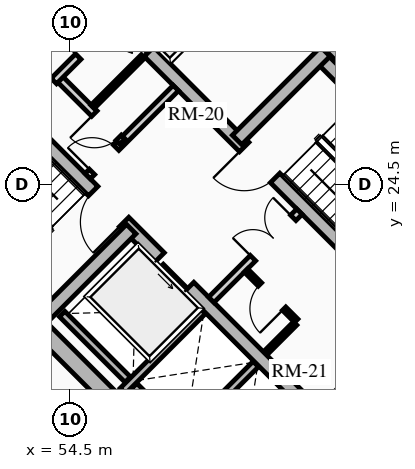
"""IFC4 building model, lengths in metres.
Left out: names, types, materials, properties, quantities, classifications, styles, units other than length and angle.
Written with IfcOpenShell. Run it as: python <this file> out.ifc"""

import sys

from ifc_helpers import new_model, si_unit, direction, frame, frame_2d, origin, place, context, subcontext, project, spatial, rectangle, extrude, source, transform, mapped, element, fill, save


model = new_model("IFC4")
c1 = context("Model", 3, precision=1e-05, world=origin(), true_north=direction((0.0, 1.0)))
c2 = subcontext(c1, "Body", "Model", "MODEL_VIEW")
j1 = project(units=[si_unit("LENGTHUNIT", "METRE"), si_unit("PLANEANGLEUNIT", "RADIAN")], contexts=[c1])
p1 = place(None, origin())
s1 = spatial("IfcSite", under=j1, at=p1, CompositionType="ELEMENT")
p2 = place(p1, origin())
s2 = spatial("IfcBuilding", under=s1, at=p2, CompositionType="ELEMENT")
p3 = place(p2, frame((0.0, 0.0, 110.89)))
s3 = spatial("IfcBuildingStorey", under=s2, at=p3, CompositionType="ELEMENT", Elevation=110.89)
for number, where, z_axis, x_axis in (
    (1, (58.737, 15.697, 0.0), (0.0, 0.0, 1.0), (-0.707, 0.707, 0.0)),
    (2, (66.303, 23.263, 0.0), (0.0, 0.0, 1.0), (-0.707, 0.707, 0.0)),
):
    element("IfcWall", number, at=place(p3, frame(where, z_axis=z_axis, x_axis=x_axis)), inside=s3, PredefinedType="SHEAR", context=c2, shape_type="SweptSolid", body=[
        extrude(rectangle(XDim=14.2, YDim=0.45, at=frame_2d((7.1, 0.0))), origin(), (0.0, 0.0, 1.0), 2.91),
    ])
p4 = place(p3, frame((58.578, 15.856, 0.0), z_axis=(0.0, 0.0, 1.0), x_axis=(0.707106781187, 0.707106781187, 0.0)))
e3 = element("IfcWall", 3, at=p4, inside=s3, PredefinedType="SHEAR", context=c2, shape_type="SweptSolid", body=[
    extrude(rectangle(XDim=10.7, YDim=0.45, at=frame_2d((5.35, 0.0))), origin(), (0.0, 0.0, 1.0), 2.91),
])
m1 = source(origin(), c2, "Body", "SweptSolid", [
    extrude(rectangle(XDim=1.5, YDim=2.02, at=frame_2d((0.75, 1.01))), frame((0.0, 0.235, 0.0), z_axis=(0.0, -1.0, 0.0), x_axis=(1.0, 0.0, 0.0)), (0.0, 0.0, 1.0), 0.47),
])
p5 = place(p4, frame((5.45, 0.0, 0.0)))
e4 = element("IfcOpeningElement", 4, at=p5, cuts=e3, PredefinedType="OPENING", context=c2, shape_type="MappedRepresentation", body=[
    mapped(m1, transform((0.0, 0.0, 0.0), x_axis=(1.0, 0.0, 0.0), y_axis=(0.0, 1.0, 0.0), z_axis=(0.0, 0.0, 1.0), scale=1.0)),
])
p6 = place(p3, frame((48.856, 25.578, 0.0), z_axis=(0.0, 0.0, 1.0), x_axis=(0.707106781187, 0.707106781187, 0.0)))
e5 = element("IfcWall", 5, at=p6, inside=s3, PredefinedType="SHEAR", context=c2, shape_type="SweptSolid", body=[
    extrude(rectangle(XDim=10.7, YDim=0.45, at=frame_2d((5.35, 0.0))), origin(), (0.0, 0.0, 1.0), 2.91),
])
p7 = place(p6, frame((4.6, 0.0, 0.0)))
e6 = element("IfcOpeningElement", 6, at=p7, cuts=e5, PredefinedType="OPENING", context=c2, shape_type="MappedRepresentation", body=[
    mapped(m1, transform((0.0, 0.0, 0.0), x_axis=(1.0, 0.0, 0.0), y_axis=(0.0, 1.0, 0.0), z_axis=(0.0, 0.0, 1.0), scale=1.0)),
])
p8 = place(p3, frame((61.078, 18.355, 0.0), z_axis=(0.0, 0.0, 1.0), x_axis=(-0.707106781187, 0.707106781187, 0.0)))
e7 = element("IfcWall", 7, at=p8, inside=s3, PredefinedType="SHEAR", context=c2, shape_type="SweptSolid", body=[
    extrude(rectangle(XDim=13.75, YDim=0.35, at=frame_2d((6.875, 0.0))), origin(), (0.0, 0.0, 1.0), 2.91),
])
m2 = source(origin(), c2, "Body", "SweptSolid", [
    extrude(rectangle(XDim=1.1, YDim=2.015, at=frame_2d((0.55, 1.007))), frame((0.0, 0.185, 0.0), z_axis=(0.0, -1.0, 0.0), x_axis=(1.0, 0.0, 0.0)), (0.0, 0.0, 1.0), 0.37),
])
p9 = place(p8, frame((4.875, 0.0, 0.0)))
e8 = element("IfcOpeningElement", 8, at=p9, cuts=e7, PredefinedType="OPENING", context=c2, shape_type="MappedRepresentation", body=[
    mapped(m2, transform((0.0, 0.0, 0.0), x_axis=(1.0, 0.0, 0.0), y_axis=(0.0, 1.0, 0.0), z_axis=(0.0, 0.0, 1.0), scale=1.0)),
])
m3 = source(origin(), c2, "Body", "SweptSolid", [
    extrude(rectangle(XDim=1.15, YDim=2.02, at=frame_2d((0.575, 1.01))), frame((0.0, 0.185, 0.0), z_axis=(0.0, -1.0, 0.0), x_axis=(1.0, 0.0, 0.0)), (0.0, 0.0, 1.0), 0.37),
])
p10 = place(p8, frame((7.295, 0.0, 0.0)))
e9 = element("IfcOpeningElement", 9, at=p10, cuts=e7, PredefinedType="OPENING", context=c2, shape_type="MappedRepresentation", body=[
    mapped(m3, transform((0.0, 0.0, 0.0), x_axis=(1.0, 0.0, 0.0), y_axis=(0.0, 1.0, 0.0), z_axis=(0.0, 0.0, 1.0), scale=1.0)),
])
p11 = place(p3, frame((63.645, 20.922, 0.0), z_axis=(0.0, 0.0, 1.0), x_axis=(-0.707106781187, 0.707106781187, 0.0)))
e10 = element("IfcWall", 10, at=p11, inside=s3, PredefinedType="SHEAR", context=c2, shape_type="SweptSolid", body=[
    extrude(rectangle(XDim=13.75, YDim=0.35, at=frame_2d((6.875, 0.0))), origin(), (0.0, 0.0, 1.0), 2.91),
])
p12 = place(p11, frame((10.0, 0.0, 0.0)))
e11 = element("IfcOpeningElement", 11, at=p12, cuts=e10, PredefinedType="OPENING", context=c2, shape_type="MappedRepresentation", body=[
    mapped(m2, transform((0.0, 0.0, 0.0), x_axis=(1.0, 0.0, 0.0), y_axis=(0.0, 1.0, 0.0), z_axis=(0.0, 0.0, 1.0), scale=1.0)),
])
p13 = place(p11, frame((12.0, 0.0, 0.0)))
e12 = element("IfcOpeningElement", 12, at=p13, cuts=e10, PredefinedType="OPENING", context=c2, shape_type="MappedRepresentation", body=[
    mapped(m2, transform((0.0, 0.0, 0.0), x_axis=(1.0, 0.0, 0.0), y_axis=(0.0, 1.0, 0.0), z_axis=(0.0, 0.0, 1.0), scale=1.0)),
])
p14 = place(p11, frame((5.305, 0.0, 0.0)))
e13 = element("IfcOpeningElement", 13, at=p14, cuts=e10, PredefinedType="OPENING", context=c2, shape_type="MappedRepresentation", body=[
    mapped(m3, transform((0.0, 0.0, 0.0), x_axis=(1.0, 0.0, 0.0), y_axis=(0.0, 1.0, 0.0), z_axis=(0.0, 0.0, 1.0), scale=1.0)),
])
p15 = place(p3, frame((53.922, 21.141, 0.0), z_axis=(0.0, 0.0, 1.0), x_axis=(-0.707088616009, 0.707124945897, 0.0)))
e14 = element("IfcWall", 14, at=p15, inside=s3, PredefinedType="SHEAR", context=c2, shape_type="SweptSolid", body=[
    extrude(rectangle(XDim=6.72, YDim=0.35, at=frame_2d((3.36, 0.0))), origin(), (0.0, 0.0, 1.0), 2.91),
])
p16 = place(p3, frame((53.784, 21.003, 0.0), z_axis=(0.0, 0.0, 1.0), x_axis=(0.707106781187, 0.707106781187, 0.0)))
e15 = element("IfcWall", 15, at=p16, inside=s3, PredefinedType="SHEAR", context=c2, shape_type="SweptSolid", body=[
    extrude(rectangle(XDim=3.285, YDim=0.35, at=frame_2d((1.643, 0.0))), origin(), (0.0, 0.0, 1.0), 2.91),
])
p17 = place(p3, frame((65.83, 23.107, 0.0), z_axis=(0.0, 0.0, 1.0), x_axis=(-0.707088616009, 0.707124945897, 0.0)))
e16 = element("IfcWall", 16, at=p17, inside=s3, PredefinedType="SHEAR", context=c2, shape_type="SweptSolid", body=[
    extrude(rectangle(XDim=6.72, YDim=0.35, at=frame_2d((3.36, 0.0))), origin(), (0.0, 0.0, 1.0), 2.91),
])
p18 = place(p3, frame((58.893, 25.674, 0.0), z_axis=(0.0, 0.0, 1.0), x_axis=(0.707106781187, 0.707106781187, 0.0)))
e17 = element("IfcWall", 17, at=p18, inside=s3, PredefinedType="SHEAR", context=c2, shape_type="SweptSolid", body=[
    extrude(rectangle(XDim=3.285, YDim=0.35, at=frame_2d((1.643, 0.0))), origin(), (0.0, 0.0, 1.0), 2.91),
])
p19 = place(p3, frame((55.888, 19.069, 0.0), z_axis=(0.0, 0.0, 1.0), x_axis=(0.707106781187, 0.707106781187, 0.0)))
e18 = element("IfcWall", 18, at=p19, inside=s3, PredefinedType="SHEAR", context=c2, shape_type="SweptSolid", body=[
    extrude(rectangle(XDim=2.97, YDim=0.2, at=frame_2d((1.485, 0.0))), origin(), (0.0, 0.0, 1.0), 2.91),
])
p20 = place(p3, frame((56.015, 19.366, 0.0), z_axis=(0.0, 0.0, 1.0), x_axis=(-0.707106781187, 0.707106781187, 0.0)))
e19 = element("IfcWall", 19, at=p20, inside=s3, PredefinedType="SHEAR", context=c2, shape_type="SweptSolid", body=[
    extrude(rectangle(XDim=2.44, YDim=0.2, at=frame_2d((1.22, 0.0))), origin(), (0.0, 0.0, 1.0), 2.91),
])
p21 = place(p3, frame((57.284, 17.673, 0.0), z_axis=(0.0, 0.0, 1.0), x_axis=(0.707147878904, 0.70706568108, 0.0)))
e20 = element("IfcWall", 20, at=p21, inside=s3, PredefinedType="SHEAR", context=c2, shape_type="SweptSolid", body=[
    extrude(rectangle(XDim=2.97, YDim=0.2, at=frame_2d((1.485, 0.0))), origin(), (0.0, 0.0, 1.0), 2.91),
])
p22 = place(p3, frame((57.412, 17.97, 0.0), z_axis=(0.0, 0.0, 1.0), x_axis=(-0.707106781187, 0.707106781187, 0.0)))
e21 = element("IfcWall", 21, at=p22, inside=s3, PredefinedType="SHEAR", context=c2, shape_type="SweptSolid", body=[
    extrude(rectangle(XDim=1.735, YDim=0.2, at=frame_2d((0.867, 0.0))), origin(), (0.0, 0.0, 1.0), 2.91),
])
p23 = place(p3, frame((57.062, 27.781, 0.0), z_axis=(0.0, 0.0, 1.0), x_axis=(0.707106781187, 0.707106781187, 0.0)))
e22 = element("IfcWall", 22, at=p23, inside=s3, PredefinedType="SHEAR", context=c2, shape_type="SweptSolid", body=[
    extrude(rectangle(XDim=2.97, YDim=0.2, at=frame_2d((1.485, 0.0))), origin(), (0.0, 0.0, 1.0), 2.91),
])
p24 = place(p3, frame((58.214, 21.467, 0.0), z_axis=(0.0, 0.0, 1.0), x_axis=(0.707106781187, 0.707106781187, 0.0)))
e23 = element("IfcWall", 23, at=p24, inside=s3, PredefinedType="PARTITIONING", context=c2, shape_type="SweptSolid", body=[
    extrude(rectangle(XDim=3.28, YDim=0.2, at=frame_2d((1.64, 0.0))), origin(), (0.0, 0.0, 1.0), 2.655),
])
m4 = source(origin(), c2, "Body", "SweptSolid", [
    extrude(rectangle(XDim=1.5, YDim=2.02, at=frame_2d((0.75, 1.01))), frame((0.0, 0.11, 0.0), z_axis=(0.0, -1.0, 0.0), x_axis=(1.0, 0.0, 0.0)), (0.0, 0.0, 1.0), 0.22),
])
p25 = place(p24, frame((1.55, 0.0, 0.0)))
e24 = element("IfcOpeningElement", 24, at=p25, cuts=e23, PredefinedType="OPENING", context=c2, shape_type="MappedRepresentation", body=[
    mapped(m4, transform((0.0, 0.0, 0.0), x_axis=(1.0, 0.0, 0.0), y_axis=(0.0, 1.0, 0.0), z_axis=(0.0, 0.0, 1.0), scale=1.0)),
])
p26 = place(p3, frame((54.961, 24.719, 0.0), z_axis=(0.0, 0.0, 1.0), x_axis=(0.707106781187, 0.707106781187, 0.0)))
e25 = element("IfcWall", 25, at=p26, inside=s3, PredefinedType="PARTITIONING", context=c2, shape_type="SweptSolid", body=[
    extrude(rectangle(XDim=3.28, YDim=0.2, at=frame_2d((1.64, 0.0))), origin(), (0.0, 0.0, 1.0), 2.655),
])
m5 = source(origin(), c2, "Body", "SweptSolid", [
    extrude(rectangle(XDim=0.9, YDim=2.005, at=frame_2d((0.45, 1.002))), frame((0.0, 0.11, 0.0), z_axis=(0.0, -1.0, 0.0), x_axis=(1.0, 0.0, 0.0)), (0.0, 0.0, 1.0), 0.22),
])
p27 = place(p26, frame((0.16, 0.0, 0.0)))
e26 = element("IfcOpeningElement", 26, at=p27, cuts=e25, PredefinedType="OPENING", context=c2, shape_type="MappedRepresentation", body=[
    mapped(m5, transform((0.0, 0.0, 0.0), x_axis=(1.0, 0.0, 0.0), y_axis=(0.0, 1.0, 0.0), z_axis=(0.0, 0.0, 1.0), scale=1.0)),
])
p28 = place(p3, frame((55.874, 25.631, 0.0), z_axis=(0.0, 0.0, 1.0), x_axis=(-0.707157639372, 0.707055919343, 0.0)))
e27 = element("IfcWall", 27, at=p28, inside=s3, PredefinedType="PARTITIONING", context=c2, shape_type="SweptSolid", body=[
    extrude(rectangle(XDim=2.4, YDim=0.2, at=frame_2d((1.2, 0.0))), origin(), (0.0, 0.0, 1.0), 2.655),
])
p29 = place(p28, frame((0.14, 0.0, 0.0)))
e28 = element("IfcOpeningElement", 28, at=p29, cuts=e27, PredefinedType="OPENING", context=c2, shape_type="MappedRepresentation", body=[
    mapped(m5, transform((0.0, 0.0, 0.0), x_axis=(1.0, 0.0, 0.0), y_axis=(0.0, 1.0, 0.0), z_axis=(0.0, 0.0, 1.0), scale=1.0)),
])
p30 = place(p3, frame((53.264, 26.416, 0.0), z_axis=(0.0, 0.0, 1.0), x_axis=(0.707106781187, 0.707106781187, 0.0)))
e29 = element("IfcWall", 29, at=p30, inside=s3, PredefinedType="PARTITIONING", context=c2, shape_type="SweptSolid", body=[
    extrude(rectangle(XDim=3.28, YDim=0.2, at=frame_2d((1.64, 0.0))), origin(), (0.0, 0.0, 1.0), 2.655),
])
m6 = source(origin(), c2, "Body", "SweptSolid", [
    extrude(rectangle(XDim=1.0, YDim=2.015, at=frame_2d((0.5, 1.007))), frame((0.0, 0.11, 0.0), z_axis=(0.0, -1.0, 0.0), x_axis=(1.0, 0.0, 0.0)), (0.0, 0.0, 1.0), 0.22),
])
p31 = place(p30, frame((0.14, 0.0, 0.0)))
e30 = element("IfcOpeningElement", 30, at=p31, cuts=e29, PredefinedType="OPENING", context=c2, shape_type="MappedRepresentation", body=[
    mapped(m6, transform((0.0, 0.0, 0.0), x_axis=(1.0, 0.0, 0.0), y_axis=(0.0, 1.0, 0.0), z_axis=(0.0, 0.0, 1.0), scale=1.0)),
])
p32 = place(p30, frame((2.05, 0.0, 0.0)))
e31 = element("IfcOpeningElement", 31, at=p32, cuts=e29, PredefinedType="OPENING", context=c2, shape_type="MappedRepresentation", body=[
    mapped(m5, transform((0.0, 0.0, 0.0), x_axis=(1.0, 0.0, 0.0), y_axis=(0.0, 1.0, 0.0), z_axis=(0.0, 0.0, 1.0), scale=1.0)),
])
p33 = place(p3, frame((60.448, 20.915, 0.0), z_axis=(0.0, 0.0, 1.0), x_axis=(-0.707106781187, 0.707106781187, 0.0)))
e32 = element("IfcWall", 32, at=p33, inside=s3, PredefinedType="PARTITIONING", context=c2, shape_type="SweptSolid", body=[
    extrude(rectangle(XDim=1.87, YDim=0.125, at=frame_2d((0.935, 0.0))), origin(), (0.0, 0.0, 1.0), 2.655),
])
m7 = source(origin(), c2, "Body", "SweptSolid", [
    extrude(rectangle(XDim=0.9, YDim=2.005, at=frame_2d((0.45, 1.002))), frame((0.0, 0.073, 0.0), z_axis=(0.0, -1.0, 0.0), x_axis=(1.0, 0.0, 0.0)), (0.0, 0.0, 1.0), 0.145),
])
p34 = place(p33, frame((0.45, 0.0, 0.0)))
e33 = element("IfcOpeningElement", 33, at=p34, cuts=e32, PredefinedType="OPENING", context=c2, shape_type="MappedRepresentation", body=[
    mapped(m7, transform((0.0, 0.0, 0.0), x_axis=(1.0, 0.0, 0.0), y_axis=(0.0, 1.0, 0.0), z_axis=(0.0, 0.0, 1.0), scale=1.0)),
])
p35 = place(p3, frame((59.643, 20.066, 0.0), z_axis=(0.0, 0.0, 1.0), x_axis=(0.707106781187, 0.707106781187, 0.0)))
e34 = element("IfcWall", 34, at=p35, inside=s3, PredefinedType="PARTITIONING", context=c2, shape_type="SweptSolid", body=[
    extrude(rectangle(XDim=1.1, YDim=0.125, at=frame_2d((0.55, 0.0))), origin(), (0.0, 0.0, 1.0), 2.655),
])
p36 = place(p3, frame((55.089, 26.543, 0.0), z_axis=(0.0, 0.0, 1.0), x_axis=(0.707106781187, 0.707106781187, 0.0)))
e35 = element("IfcWall", 35, at=p36, inside=s3, PredefinedType="PARTITIONING", context=c2, shape_type="SweptSolid", body=[
    extrude(rectangle(XDim=1.88, YDim=0.125, at=frame_2d((0.94, 0.0))), origin(), (0.0, 0.0, 1.0), 2.655),
])
m8 = source(origin(), c2, "Body", "SweptSolid", [
    extrude(rectangle(XDim=1.1, YDim=2.015, at=frame_2d((0.55, 1.007))), frame((0.0, 0.025, 0.0), z_axis=(0.0, -1.0, 0.0), x_axis=(1.0, 0.0, 0.0)), (0.0, 0.0, 1.0), 0.05),
])
p37 = place(p9, origin())
e36 = element("IfcDoor", 36, at=p37, inside=s3, OperationType="SLIDING_TO_LEFT", PredefinedType="DOOR", context=c2, shape_type="MappedRepresentation", body=[
    mapped(m8, transform((0.0, 0.0, 0.0), x_axis=(1.0, 0.0, 0.0), y_axis=(0.0, 1.0, 0.0), z_axis=(0.0, 0.0, 1.0), scale=1.0)),
])
fill(e8, e36)
m9 = source(origin(), c2, "Body", "SweptSolid", [
    extrude(rectangle(XDim=1.15, YDim=2.02, at=frame_2d((0.575, 1.01))), frame((0.0, 0.025, 0.0), z_axis=(0.0, -1.0, 0.0), x_axis=(1.0, 0.0, 0.0)), (0.0, 0.0, 1.0), 0.05),
])
p38 = place(p10, origin())
e37 = element("IfcDoor", 37, at=p38, inside=s3, OperationType="SINGLE_SWING_LEFT", PredefinedType="DOOR", context=c2, shape_type="MappedRepresentation", body=[
    mapped(m9, transform((0.0, 0.0, 0.0), x_axis=(1.0, 0.0, 0.0), y_axis=(0.0, 1.0, 0.0), z_axis=(0.0, 0.0, 1.0), scale=1.0)),
])
fill(e9, e37)
p39 = place(p14, origin())
e38 = element("IfcDoor", 38, at=p39, inside=s3, OperationType="SINGLE_SWING_RIGHT", PredefinedType="DOOR", context=c2, shape_type="MappedRepresentation", body=[
    mapped(m9, transform((0.0, 0.0, 0.0), x_axis=(1.0, 0.0, 0.0), y_axis=(0.0, 1.0, 0.0), z_axis=(0.0, 0.0, 1.0), scale=1.0)),
])
fill(e13, e38)
m10 = source(origin(), c2, "Body", "SweptSolid", [
    extrude(rectangle(XDim=1.5, YDim=2.02, at=frame_2d((0.75, 1.01))), frame((0.0, 0.025, 0.0), z_axis=(0.0, -1.0, 0.0), x_axis=(1.0, 0.0, 0.0)), (0.0, 0.0, 1.0), 0.05),
])
p40 = place(p25, origin())
e39 = element("IfcDoor", 39, at=p40, inside=s3, OperationType="DOUBLE_DOOR_SINGLE_SWING", PredefinedType="DOOR", context=c2, shape_type="MappedRepresentation", body=[
    mapped(m10, transform((0.0, 0.0, 0.0), x_axis=(1.0, 0.0, 0.0), y_axis=(0.0, 1.0, 0.0), z_axis=(0.0, 0.0, 1.0), scale=1.0)),
])
fill(e24, e39)
m11 = source(origin(), c2, "Body", "SweptSolid", [
    extrude(rectangle(XDim=0.9, YDim=2.005, at=frame_2d((0.45, 1.002))), frame((0.0, 0.025, 0.0), z_axis=(0.0, -1.0, 0.0), x_axis=(1.0, 0.0, 0.0)), (0.0, 0.0, 1.0), 0.05),
])
p41 = place(p27, origin())
e40 = element("IfcDoor", 40, at=p41, inside=s3, OperationType="SINGLE_SWING_LEFT", PredefinedType="DOOR", context=c2, shape_type="MappedRepresentation", body=[
    mapped(m11, transform((0.0, 0.0, 0.0), x_axis=(1.0, 0.0, 0.0), y_axis=(0.0, 1.0, 0.0), z_axis=(0.0, 0.0, 1.0), scale=1.0)),
])
fill(e26, e40)
m12 = source(origin(), c2, "Body", "SweptSolid", [
    extrude(rectangle(XDim=1.0, YDim=2.015, at=frame_2d((0.5, 1.007))), frame((0.0, 0.025, 0.0), z_axis=(0.0, -1.0, 0.0), x_axis=(1.0, 0.0, 0.0)), (0.0, 0.0, 1.0), 0.05),
])
p42 = place(p31, origin())
e41 = element("IfcDoor", 41, at=p42, inside=s3, OperationType="SINGLE_SWING_RIGHT", PredefinedType="DOOR", context=c2, shape_type="MappedRepresentation", body=[
    mapped(m12, transform((0.0, 0.0, 0.0), x_axis=(1.0, 0.0, 0.0), y_axis=(0.0, 1.0, 0.0), z_axis=(0.0, 0.0, 1.0), scale=1.0)),
])
fill(e30, e41)
p43 = place(p34, origin())
e42 = element("IfcDoor", 42, at=p43, inside=s3, OperationType="SINGLE_SWING_LEFT", PredefinedType="DOOR", context=c2, shape_type="MappedRepresentation", body=[
    mapped(m11, transform((0.0, 0.0, 0.0), x_axis=(1.0, 0.0, 0.0), y_axis=(0.0, 1.0, 0.0), z_axis=(0.0, 0.0, 1.0), scale=1.0)),
])
fill(e33, e42)
p44 = place(p29, origin())
e43 = element("IfcDoor", 43, at=p44, inside=s3, OperationType="SINGLE_SWING_RIGHT", PredefinedType="DOOR", context=c2, shape_type="MappedRepresentation", body=[
    mapped(m11, transform((0.0, 0.0, 0.0), x_axis=(1.0, 0.0, 0.0), y_axis=(0.0, 1.0, 0.0), z_axis=(0.0, 0.0, 1.0), scale=1.0)),
])
fill(e28, e43)
p45 = place(p32, origin())
e44 = element("IfcDoor", 44, at=p45, inside=s3, OperationType="SINGLE_SWING_LEFT", PredefinedType="DOOR", context=c2, shape_type="MappedRepresentation", body=[
    mapped(m11, transform((0.0, 0.0, 0.0), x_axis=(1.0, 0.0, 0.0), y_axis=(0.0, 1.0, 0.0), z_axis=(0.0, 0.0, 1.0), scale=1.0)),
])
fill(e31, e44)
save(model, sys.argv[1])
